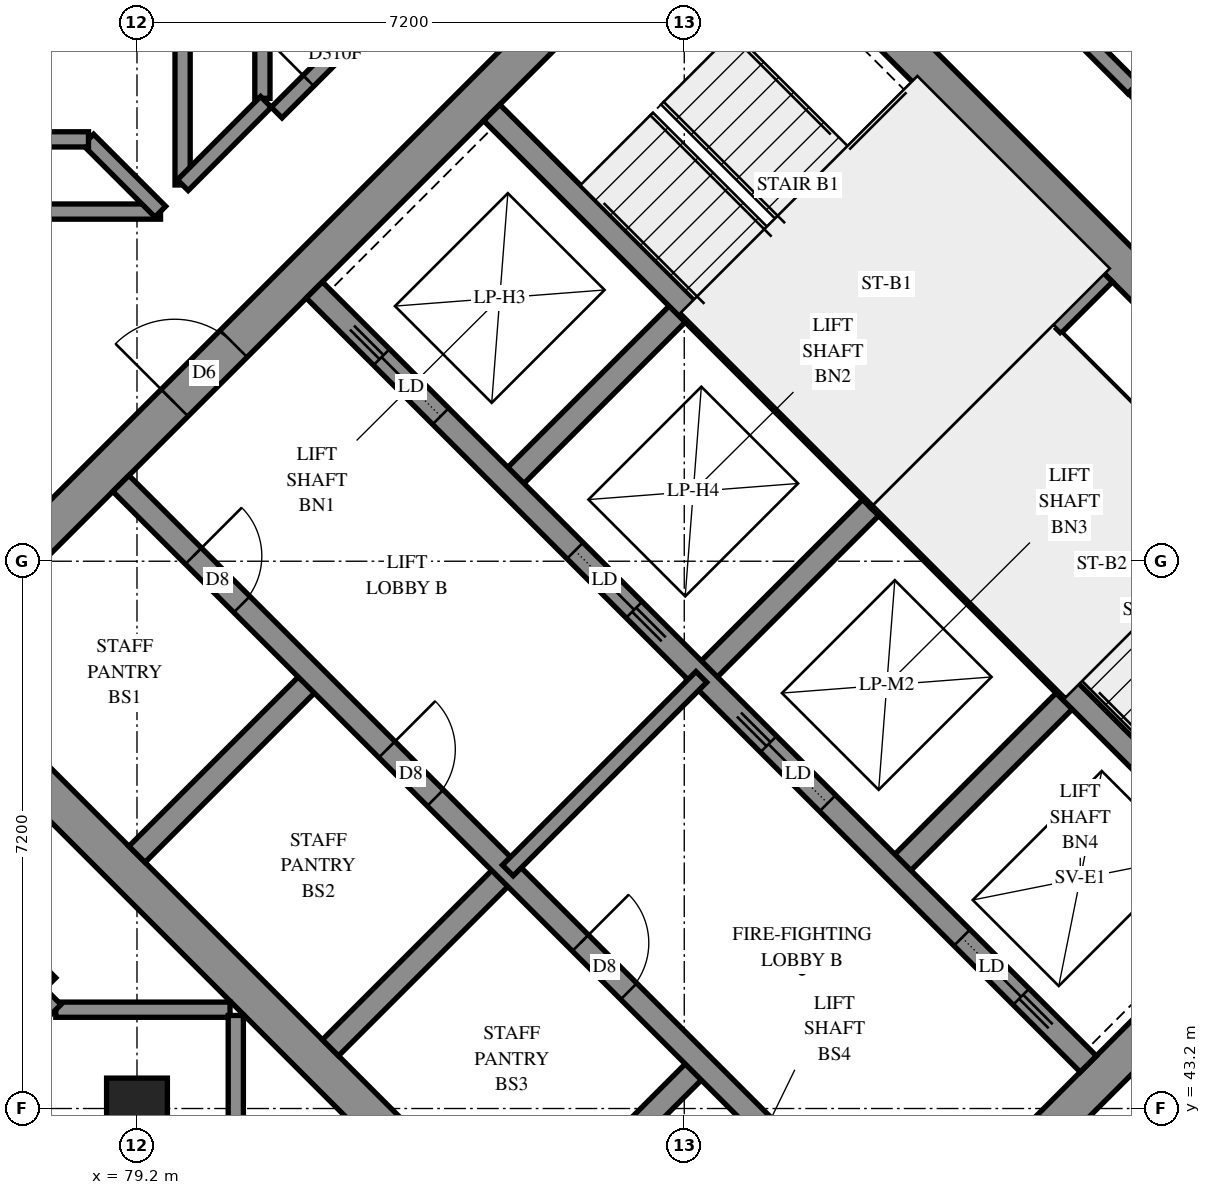
"""IFC4 building model, lengths in metres.
Left out: names, types, materials, properties, quantities, classifications, styles, units other than length and angle.
Written with IfcOpenShell. Run it as: python <this file> out.ifc"""

import sys

from ifc_helpers import new_model, si_unit, direction, frame, frame_2d, origin, origin_2d, place, context, subcontext, project, spatial, rectangle, extrude, element, fill, save


model = new_model("IFC4")
c1 = context("Model", 3, precision=1e-05, world=origin(), true_north=direction((0.0, 1.0)))
c2 = subcontext(c1, "Body", "Model", "MODEL_VIEW")
j1 = project(units=[si_unit("LENGTHUNIT", "METRE"), si_unit("PLANEANGLEUNIT", "RADIAN")], contexts=[c1])
p1 = place(None, origin())
s1 = spatial("IfcSite", under=j1, at=p1, CompositionType="ELEMENT")
p2 = place(p1, origin())
s2 = spatial("IfcBuilding", under=s1, at=p2, CompositionType="ELEMENT")
p3 = place(p2, frame((0.0, 0.0, 213.4)))
s3 = spatial("IfcBuildingStorey", under=s2, at=p3, CompositionType="ELEMENT", Elevation=213.4)
p4 = place(p3, frame((79.2, 43.2, 0.0), z_axis=(0.0, 0.0, 1.0), x_axis=(1.0, 0.0, 0.0)))
e1 = element("IfcColumn", 1, at=p4, inside=s3, PredefinedType="COLUMN", context=c2, shape_type="SweptSolid", body=[
    extrude(rectangle(XDim=0.8, YDim=0.8, at=origin_2d()), origin(), (0.0, 0.0, 1.0), 3.1),
])
p5 = place(p3, frame((76.124, 49.267, -0.3), z_axis=(0.0, 0.0, 1.0), x_axis=(0.7071067812, -0.7071067812, 0.0)))
e2 = element("IfcWall", 2, at=p5, inside=s3, PredefinedType="SHEAR", context=c2, shape_type="SweptSolid", body=[
    extrude(rectangle(XDim=15.4, YDim=0.5, at=frame_2d((7.7, 0.0))), origin(), (0.0, 0.0, 1.0), 2.7),
])
p6 = place(p3, frame((86.66, 59.802, -0.3), z_axis=(0.0, 0.0, 1.0), x_axis=(0.7071067812, -0.7071067812, 0.0)))
e3 = element("IfcWall", 3, at=p6, inside=s3, PredefinedType="SHEAR", context=c2, shape_type="SweptSolid", body=[
    extrude(rectangle(XDim=15.4, YDim=0.5, at=frame_2d((7.7, 0.0))), origin(), (0.0, 0.0, 1.0), 2.7),
])
p7 = place(p6, frame((10.5, 0.0, 0.3)))
e4 = element("IfcOpeningElement", 4, at=p7, cuts=e3, PredefinedType="OPENING", context=c2, shape_type="SweptSolid", body=[
    extrude(rectangle(XDim=0.8, YDim=2.1, at=frame_2d((0.4, 1.05))), frame((0.0, 0.26, 0.0), z_axis=(0.0, -1.0, 0.0), x_axis=(1.0, 0.0, 0.0)), (0.0, 0.0, 1.0), 0.52),
])
p8 = place(p3, frame((76.478, 49.267, -0.3), z_axis=(0.0, 0.0, 1.0), x_axis=(0.7071067812, 0.7071067812, 0.0)))
e5 = element("IfcWall", 5, at=p8, inside=s3, PredefinedType="SHEAR", context=c2, shape_type="SweptSolid", body=[
    extrude(rectangle(XDim=14.4, YDim=0.5, at=frame_2d((7.2, 0.0))), origin(), (0.0, 0.0, 1.0), 2.7),
])
p9 = place(p8, frame((4.55, 0.0, 0.3)))
e6 = element("IfcOpeningElement", 6, at=p9, cuts=e5, PredefinedType="OPENING", context=c2, shape_type="SweptSolid", body=[
    extrude(rectangle(XDim=1.1, YDim=2.1, at=frame_2d((0.55, 1.05))), frame((0.0, 0.26, 0.0), z_axis=(0.0, -1.0, 0.0), x_axis=(1.0, 0.0, 0.0)), (0.0, 0.0, 1.0), 0.52),
])
p10 = place(p8, frame((11.35, 0.0, 0.3)))
e7 = element("IfcOpeningElement", 7, at=p10, cuts=e5, PredefinedType="OPENING", context=c2, shape_type="SweptSolid", body=[
    extrude(rectangle(XDim=1.1, YDim=2.1, at=frame_2d((0.55, 1.05))), frame((0.0, 0.26, 0.0), z_axis=(0.0, -1.0, 0.0), x_axis=(1.0, 0.0, 0.0)), (0.0, 0.0, 1.0), 0.52),
])
p11 = place(p3, frame((87.013, 38.731, -0.3), z_axis=(0.0, 0.0, 1.0), x_axis=(0.7071067812, 0.7071067812, 0.0)))
e8 = element("IfcWall", 8, at=p11, inside=s3, PredefinedType="SHEAR", context=c2, shape_type="SweptSolid", body=[
    extrude(rectangle(XDim=14.4, YDim=0.5, at=frame_2d((7.2, 0.0))), origin(), (0.0, 0.0, 1.0), 2.7),
])
p12 = place(p11, frame((4.55, 0.0, 0.3)))
e9 = element("IfcOpeningElement", 9, at=p12, cuts=e8, PredefinedType="OPENING", context=c2, shape_type="SweptSolid", body=[
    extrude(rectangle(XDim=1.1, YDim=2.1, at=frame_2d((0.55, 1.05))), frame((0.0, 0.26, 0.0), z_axis=(0.0, -1.0, 0.0), x_axis=(1.0, 0.0, 0.0)), (0.0, 0.0, 1.0), 0.52),
])
p13 = place(p11, frame((11.35, 0.0, 0.3)))
e10 = element("IfcOpeningElement", 10, at=p13, cuts=e8, PredefinedType="OPENING", context=c2, shape_type="SweptSolid", body=[
    extrude(rectangle(XDim=1.1, YDim=2.1, at=frame_2d((0.55, 1.05))), frame((0.0, 0.26, 0.0), z_axis=(0.0, -1.0, 0.0), x_axis=(1.0, 0.0, 0.0)), (0.0, 0.0, 1.0), 0.52),
])
for number, where, z_axis, x_axis in (
    (11, (79.2, 46.544, 0.0), (0.0, 0.0, 1.0), (0.707, 0.707, 0.0)),
    (12, (84.079, 51.423, 0.0), (0.0, 0.0, 1.0), (0.707, 0.707, 0.0)),
):
    element("IfcWall", number, at=place(p3, frame(where, z_axis=z_axis, x_axis=x_axis)), inside=s3, PredefinedType="SOLIDWALL", context=c2, shape_type="SweptSolid", body=[
        extrude(rectangle(XDim=3.3, YDim=0.3, at=frame_2d((1.65, 0.0))), origin(), (0.0, 0.0, 1.0), 3.1),
    ])
p14 = place(p3, frame((81.746, 43.999, 0.0), z_axis=(0.0, 0.0, 1.0), x_axis=(0.7071067812, 0.7071067812, 0.0)))
e13 = element("IfcWall", 13, at=p14, inside=s3, PredefinedType="SOLIDWALL", context=c2, shape_type="SweptSolid", body=[
    extrude(rectangle(XDim=3.3, YDim=0.3, at=frame_2d((1.65, 0.0))), origin(), (0.0, 0.0, 1.0), 3.1),
])
p15 = place(p3, frame((86.625, 48.878, 0.0), z_axis=(0.0, 0.0, 1.0), x_axis=(0.7071067812, 0.7071067812, 0.0)))
e14 = element("IfcWall", 14, at=p15, inside=s3, PredefinedType="SOLIDWALL", context=c2, shape_type="SweptSolid", body=[
    extrude(rectangle(XDim=3.3, YDim=0.3, at=frame_2d((1.65, 0.0))), origin(), (0.0, 0.0, 1.0), 3.1),
])
p16 = place(p3, frame((84.291, 41.453, 0.0), z_axis=(0.0, 0.0, 1.0), x_axis=(0.7071067812, 0.7071067812, 0.0)))
e15 = element("IfcWall", 15, at=p16, inside=s3, PredefinedType="SOLIDWALL", context=c2, shape_type="SweptSolid", body=[
    extrude(rectangle(XDim=3.3, YDim=0.3, at=frame_2d((1.65, 0.0))), origin(), (0.0, 0.0, 1.0), 3.1),
])
p17 = place(p3, frame((89.17, 46.332, 0.0), z_axis=(0.0, 0.0, 1.0), x_axis=(0.7071067812, 0.7071067812, 0.0)))
e16 = element("IfcWall", 16, at=p17, inside=s3, PredefinedType="SOLIDWALL", context=c2, shape_type="SweptSolid", body=[
    extrude(rectangle(XDim=3.3, YDim=0.3, at=frame_2d((1.65, 0.0))), origin(), (0.0, 0.0, 1.0), 3.1),
])
p18 = place(p3, frame((78.988, 51.423, 0.0), z_axis=(0.0, 0.0, 1.0), x_axis=(0.7071067812, -0.7071067812, 0.0)))
e17 = element("IfcWall", 17, at=p18, inside=s3, PredefinedType="SOLIDWALL", context=c2, shape_type="SweptSolid", body=[
    extrude(rectangle(XDim=14.4, YDim=0.3, at=frame_2d((7.2, 0.0))), origin(), (0.0, 0.0, 1.0), 3.1),
])
p19 = place(p18, frame((1.35, 0.0, 0.0)))
e18 = element("IfcOpeningElement", 18, at=p19, cuts=e17, PredefinedType="OPENING", context=c2, shape_type="SweptSolid", body=[
    extrude(rectangle(XDim=0.9, YDim=2.1, at=frame_2d((0.45, 1.05))), frame((0.0, 0.16, 0.0), z_axis=(0.0, -1.0, 0.0), x_axis=(1.0, 0.0, 0.0)), (0.0, 0.0, 1.0), 0.32),
])
p20 = place(p18, frame((4.95, 0.0, 0.0)))
e19 = element("IfcOpeningElement", 19, at=p20, cuts=e17, PredefinedType="OPENING", context=c2, shape_type="SweptSolid", body=[
    extrude(rectangle(XDim=0.9, YDim=2.1, at=frame_2d((0.45, 1.05))), frame((0.0, 0.16, 0.0), z_axis=(0.0, -1.0, 0.0), x_axis=(1.0, 0.0, 0.0)), (0.0, 0.0, 1.0), 0.32),
])
p21 = place(p18, frame((8.55, 0.0, 0.0)))
e20 = element("IfcOpeningElement", 20, at=p21, cuts=e17, PredefinedType="OPENING", context=c2, shape_type="SweptSolid", body=[
    extrude(rectangle(XDim=0.9, YDim=2.1, at=frame_2d((0.45, 1.05))), frame((0.0, 0.16, 0.0), z_axis=(0.0, -1.0, 0.0), x_axis=(1.0, 0.0, 0.0)), (0.0, 0.0, 1.0), 0.32),
])
p22 = place(p18, frame((12.05, 0.0, 0.0)))
e21 = element("IfcOpeningElement", 21, at=p22, cuts=e17, PredefinedType="OPENING", context=c2, shape_type="SweptSolid", body=[
    extrude(rectangle(XDim=1.1, YDim=2.1, at=frame_2d((0.55, 1.05))), frame((0.0, 0.16, 0.0), z_axis=(0.0, -1.0, 0.0), x_axis=(1.0, 0.0, 0.0)), (0.0, 0.0, 1.0), 0.32),
])
p23 = place(p3, frame((81.534, 53.969, 0.0), z_axis=(0.0, 0.0, 1.0), x_axis=(0.707103309, -0.7071102534, 0.0)))
e22 = element("IfcWall", 22, at=p23, inside=s3, PredefinedType="SOLIDWALL", context=c2, shape_type="SweptSolid", body=[
    extrude(rectangle(XDim=14.4, YDim=0.3, at=frame_2d((7.2, 0.0))), origin(), (0.0, 0.0, 1.0), 3.1),
])
p24 = place(p23, frame((1.25, 0.0, 0.0)))
e23 = element("IfcOpeningElement", 23, at=p24, cuts=e22, PredefinedType="OPENING", context=c2, shape_type="SweptSolid", body=[
    extrude(rectangle(XDim=1.1, YDim=2.1, at=frame_2d((0.55, 1.05))), frame((0.0, 0.16, 0.0), z_axis=(0.0, -1.0, 0.0), x_axis=(1.0, 0.0, 0.0)), (0.0, 0.0, 1.0), 0.32),
])
p25 = place(p23, frame((4.85, 0.0, 0.0)))
e24 = element("IfcOpeningElement", 24, at=p25, cuts=e22, PredefinedType="OPENING", context=c2, shape_type="SweptSolid", body=[
    extrude(rectangle(XDim=1.1, YDim=2.1, at=frame_2d((0.55, 1.05))), frame((0.0, 0.16, 0.0), z_axis=(0.0, -1.0, 0.0), x_axis=(1.0, 0.0, 0.0)), (0.0, 0.0, 1.0), 0.32),
])
p26 = place(p23, frame((8.45, 0.0, 0.0)))
e25 = element("IfcOpeningElement", 25, at=p26, cuts=e22, PredefinedType="OPENING", context=c2, shape_type="SweptSolid", body=[
    extrude(rectangle(XDim=1.1, YDim=2.1, at=frame_2d((0.55, 1.05))), frame((0.0, 0.16, 0.0), z_axis=(0.0, -1.0, 0.0), x_axis=(1.0, 0.0, 0.0)), (0.0, 0.0, 1.0), 0.32),
])
p27 = place(p23, frame((12.05, 0.0, 0.0)))
e26 = element("IfcOpeningElement", 26, at=p27, cuts=e22, PredefinedType="OPENING", context=c2, shape_type="SweptSolid", body=[
    extrude(rectangle(XDim=1.1, YDim=2.1, at=frame_2d((0.55, 1.05))), frame((0.0, 0.16, 0.0), z_axis=(0.0, -1.0, 0.0), x_axis=(1.0, 0.0, 0.0)), (0.0, 0.0, 1.0), 0.32),
])
for number, where, z_axis, x_axis in (
    (27, (83.867, 56.302, 0.0), (0.0, 0.0, 1.0), (0.707, -0.707, 0.0)),
    (28, (88.958, 51.211, 0.0), (0.0, 0.0, 1.0), (0.707, -0.707, 0.0)),
):
    element("IfcWall", number, at=place(p3, frame(where, z_axis=z_axis, x_axis=x_axis)), inside=s3, PredefinedType="SOLIDWALL", context=c2, shape_type="SweptSolid", body=[
        extrude(rectangle(XDim=7.2, YDim=0.3, at=frame_2d((3.6, 0.0))), origin(), (0.0, 0.0, 1.0), 3.1),
    ])
p28 = place(p3, frame((88.958, 51.211, 0.0), z_axis=(0.0, 0.0, 1.0), x_axis=(0.7071067812, 0.7071067812, 0.0)))
e29 = element("IfcWall", 29, at=p28, inside=s3, PredefinedType="SOLIDWALL", context=c2, shape_type="SweptSolid", body=[
    extrude(rectangle(XDim=4.2, YDim=0.3, at=frame_2d((2.1, 0.0))), origin(), (0.0, 0.0, 1.0), 3.1),
])
p29 = place(p3, frame((91.313, 53.354, 0.0), z_axis=(0.0, 0.0, 1.0), x_axis=(0.7071140275, -0.7070995348, 0.0)))
e30 = element("IfcWall", 30, at=p29, inside=s3, PredefinedType="PARTITIONING", context=c2, shape_type="SweptSolid", body=[
    extrude(rectangle(XDim=6.9, YDim=0.15, at=frame_2d((3.45, 0.0))), origin(), (0.0, 0.0, 1.0), 3.1),
])
p30 = place(p3, frame((84.079, 46.332, 0.0), z_axis=(0.0, 0.0, 1.0), x_axis=(0.7071067812, 0.7071067812, 0.0)))
e31 = element("IfcWall", 31, at=p30, inside=s3, PredefinedType="PARTITIONING", context=c2, shape_type="SweptSolid", body=[
    extrude(rectangle(XDim=3.6, YDim=0.2, at=frame_2d((1.8, 0.0))), origin(), (0.0, 0.0, 1.0), 3.1),
])
p31 = place(p3, frame((81.037, 56.303, 0.0), z_axis=(0.0, 0.0, 1.0), x_axis=(0.7071067812, 0.7071067812, 0.0)))
e32 = element("IfcWall", 32, at=p31, inside=s3, PredefinedType="PARTITIONING", context=c2, shape_type="SweptSolid", body=[
    extrude(rectangle(XDim=8.2, YDim=0.2, at=frame_2d((4.1, 0.0))), origin(), (0.0, 0.0, 1.0), 3.1),
])
p32 = place(p31, frame((0.592, 0.0, 0.0)))
e33 = element("IfcOpeningElement", 33, at=p32, cuts=e32, PredefinedType="OPENING", context=c2, shape_type="SweptSolid", body=[
    extrude(rectangle(XDim=1.0, YDim=2.1, at=frame_2d((0.5, 1.05))), frame((0.0, 0.11, 0.0), z_axis=(0.0, -1.0, 0.0), x_axis=(1.0, 0.0, 0.0)), (0.0, 0.0, 1.0), 0.22),
])
p33 = place(p3, frame((73.999, 48.911, 0.0), z_axis=(0.0, 0.0, 1.0), x_axis=(0.7071067812, -0.7071067812, 0.0)))
e34 = element("IfcWall", 34, at=p33, inside=s3, PredefinedType="PARTITIONING", context=c2, shape_type="SweptSolid", body=[
    extrude(rectangle(XDim=5.745, YDim=0.2, at=frame_2d((2.872, 0.0))), origin(), (0.0, 0.0, 1.0), 3.1),
])
p34 = place(p33, frame((0.724, 0.0, 0.0)))
e35 = element("IfcOpeningElement", 35, at=p34, cuts=e34, PredefinedType="OPENING", context=c2, shape_type="SweptSolid", body=[
    extrude(rectangle(XDim=1.0, YDim=2.1, at=frame_2d((0.5, 1.05))), frame((0.0, 0.11, 0.0), z_axis=(0.0, -1.0, 0.0), x_axis=(1.0, 0.0, 0.0)), (0.0, 0.0, 1.0), 0.22),
])
p35 = place(p3, frame((88.247, 60.683, 0.0), z_axis=(0.0, 0.0, 1.0), x_axis=(0.7071067812, -0.7071067812, 0.0)))
e36 = element("IfcWall", 36, at=p35, inside=s3, PredefinedType="PARTITIONING", context=c2, shape_type="SweptSolid", body=[
    extrude(rectangle(XDim=5.742, YDim=0.2, at=frame_2d((2.871, 0.0))), origin(), (0.0, 0.0, 1.0), 3.1),
])
p36 = place(p35, frame((4.069, 0.0, 0.0)))
e37 = element("IfcOpeningElement", 37, at=p36, cuts=e36, PredefinedType="OPENING", context=c2, shape_type="SweptSolid", body=[
    extrude(rectangle(XDim=0.9, YDim=2.1, at=frame_2d((0.45, 1.05))), frame((0.0, 0.11, 0.0), z_axis=(0.0, -1.0, 0.0), x_axis=(1.0, 0.0, 0.0)), (0.0, 0.0, 1.0), 0.22),
])
p37 = place(p3, frame((74.002, 55.0, 0.0), z_axis=(0.0, 0.0, 1.0), x_axis=(1.0, 0.0, 0.0)))
e38 = element("IfcWall", 38, at=p37, inside=s3, PredefinedType="PARTITIONING", context=c2, shape_type="SweptSolid", body=[
    extrude(rectangle(XDim=5.508, YDim=0.2, at=frame_2d((2.754, 0.0))), origin(), (0.0, 0.0, 1.0), 3.1),
])
p38 = place(p37, frame((1.51, 0.0, 0.0)))
e39 = element("IfcOpeningElement", 39, at=p38, cuts=e38, PredefinedType="OPENING", context=c2, shape_type="SweptSolid", body=[
    extrude(rectangle(XDim=1.0, YDim=2.1, at=frame_2d((0.5, 1.05))), frame((0.0, 0.11, 0.0), z_axis=(0.0, -1.0, 0.0), x_axis=(1.0, 0.0, 0.0)), (0.0, 0.0, 1.0), 0.22),
])
p39 = place(p3, frame((79.8, 55.35, 0.0), z_axis=(0.0, 0.0, 1.0), x_axis=(0.0, 1.0, 0.0)))
e40 = element("IfcWall", 40, at=p39, inside=s3, PredefinedType="PARTITIONING", context=c2, shape_type="SweptSolid", body=[
    extrude(rectangle(XDim=3.9, YDim=0.2, at=frame_2d((1.95, 0.0))), origin(), (0.0, 0.0, 1.0), 3.1),
])
for number, where, z_axis, x_axis in (
    (41, (78.132, 44.5, 0.0), (0.0, 0.0, 1.0), (1.0, 0.0, 0.0)),
    (42, (80.5, 42.132, 0.0), (0.0, 0.0, 1.0), (0.0, 1.0, 0.0)),
):
    element("IfcWall", number, at=place(p3, frame(where, z_axis=z_axis, x_axis=x_axis)), inside=s3, PredefinedType="PARTITIONING", context=c2, shape_type="SweptSolid", body=[
        extrude(rectangle(XDim=2.292, YDim=0.2, at=frame_2d((1.146, 0.0))), origin(), (0.0, 0.0, 1.0), 3.1),
    ])
p40 = place(p3, frame((80.85, 56.49, 0.0), z_axis=(0.0, 0.0, 1.0), x_axis=(0.0, 1.0, 0.0)))
e43 = element("IfcWall", 43, at=p40, inside=s3, PredefinedType="PARTITIONING", context=c2, shape_type="SweptSolid", body=[
    extrude(rectangle(XDim=1.886, YDim=0.2, at=frame_2d((0.943, 0.0))), origin(), (0.0, 0.0, 1.0), 3.1),
])
p41 = place(p3, frame((79.803, 55.347, 0.0), z_axis=(0.0, 0.0, 1.0), x_axis=(0.706460727, 0.7077522457, 0.0)))
e44 = element("IfcWall", 44, at=p41, inside=s3, PredefinedType="PARTITIONING", context=c2, shape_type="SweptSolid", body=[
    extrude(rectangle(XDim=1.549, YDim=0.2, at=frame_2d((0.774, 0.0))), origin(), (0.0, 0.0, 1.0), 3.1),
])
p42 = place(p3, frame((92.311, 56.627, 0.0), z_axis=(0.0, 0.0, 1.0), x_axis=(0.7077922938, -0.7064206033, 0.0)))
e45 = element("IfcWall", 45, at=p42, inside=s3, PredefinedType="PARTITIONING", context=c2, shape_type="SweptSolid", body=[
    extrude(rectangle(XDim=1.458, YDim=0.2, at=frame_2d((0.729, 0.0))), origin(), (0.0, 0.0, 1.0), 3.1),
])
p43 = place(p3, frame((78.559, 55.947, 0.0), z_axis=(0.0, 0.0, 1.0), x_axis=(0.7071067812, -0.7071067812, 0.0)))
e46 = element("IfcWall", 46, at=p43, inside=s3, PredefinedType="PARTITIONING", context=c2, shape_type="SweptSolid", body=[
    extrude(rectangle(XDim=1.341, YDim=0.2, at=frame_2d((0.67, 0.0))), origin(), (0.0, 0.0, 1.0), 3.1),
])
p44 = place(p3, frame((77.552, 55.95, 0.0), z_axis=(0.0, 0.0, 1.0), x_axis=(1.0, 0.0, 0.0)))
e47 = element("IfcWall", 47, at=p44, inside=s3, PredefinedType="PARTITIONING", context=c2, shape_type="SweptSolid", body=[
    extrude(rectangle(XDim=1.01, YDim=0.2, at=frame_2d((0.505, 0.0))), origin(), (0.0, 0.0, 1.0), 3.1),
])
p45 = place(p3, frame((77.779, 44.847, 0.0), z_axis=(0.0, 0.0, 1.0), x_axis=(0.7071067812, -0.7071067812, 0.0)))
e48 = element("IfcWall", 48, at=p45, inside=s3, PredefinedType="PARTITIONING", context=c2, shape_type="SweptSolid", body=[
    extrude(rectangle(XDim=0.495, YDim=0.2, at=frame_2d((0.247, 0.0))), origin(), (0.0, 0.0, 1.0), 3.1),
])
p46 = place(p9, origin())
e49 = element("IfcDoor", 49, at=p46, inside=s3, OperationType="DOUBLE_DOOR_SINGLE_SWING", PredefinedType="DOOR", context=c2, shape_type="SweptSolid", body=[
    extrude(rectangle(XDim=1.1, YDim=2.1, at=frame_2d((0.55, 1.05))), frame((0.0, 0.025, 0.0), z_axis=(0.0, -1.0, 0.0), x_axis=(1.0, 0.0, 0.0)), (0.0, 0.0, 1.0), 0.05),
])
fill(e6, e49)
p47 = place(p19, origin())
e50 = element("IfcDoor", 50, at=p47, inside=s3, OperationType="SINGLE_SWING_LEFT", PredefinedType="DOOR", context=c2, shape_type="SweptSolid", body=[
    extrude(rectangle(XDim=0.9, YDim=2.1, at=frame_2d((0.45, 1.05))), frame((0.0, 0.025, 0.0), z_axis=(0.0, -1.0, 0.0), x_axis=(1.0, 0.0, 0.0)), (0.0, 0.0, 1.0), 0.05),
])
fill(e18, e50)
p48 = place(p20, origin())
e51 = element("IfcDoor", 51, at=p48, inside=s3, OperationType="SINGLE_SWING_LEFT", PredefinedType="DOOR", context=c2, shape_type="SweptSolid", body=[
    extrude(rectangle(XDim=0.9, YDim=2.1, at=frame_2d((0.45, 1.05))), frame((0.0, 0.025, 0.0), z_axis=(0.0, -1.0, 0.0), x_axis=(1.0, 0.0, 0.0)), (0.0, 0.0, 1.0), 0.05),
])
fill(e19, e51)
p49 = place(p21, origin())
e52 = element("IfcDoor", 52, at=p49, inside=s3, OperationType="SINGLE_SWING_LEFT", PredefinedType="DOOR", context=c2, shape_type="SweptSolid", body=[
    extrude(rectangle(XDim=0.9, YDim=2.1, at=frame_2d((0.45, 1.05))), frame((0.0, 0.025, 0.0), z_axis=(0.0, -1.0, 0.0), x_axis=(1.0, 0.0, 0.0)), (0.0, 0.0, 1.0), 0.05),
])
fill(e20, e52)
p50 = place(p24, origin())
e53 = element("IfcDoor", 53, at=p50, inside=s3, OperationType="SLIDING_TO_LEFT", PredefinedType="DOOR", context=c2, shape_type="SweptSolid", body=[
    extrude(rectangle(XDim=1.1, YDim=2.1, at=frame_2d((0.55, 1.05))), frame((0.0, 0.025, 0.0), z_axis=(0.0, -1.0, 0.0), x_axis=(1.0, 0.0, 0.0)), (0.0, 0.0, 1.0), 0.05),
])
fill(e23, e53)
p51 = place(p25, origin())
e54 = element("IfcDoor", 54, at=p51, inside=s3, OperationType="SLIDING_TO_RIGHT", PredefinedType="DOOR", context=c2, shape_type="SweptSolid", body=[
    extrude(rectangle(XDim=1.1, YDim=2.1, at=frame_2d((0.55, 1.05))), frame((0.0, 0.025, 0.0), z_axis=(0.0, -1.0, 0.0), x_axis=(1.0, 0.0, 0.0)), (0.0, 0.0, 1.0), 0.05),
])
fill(e24, e54)
p52 = place(p26, origin())
e55 = element("IfcDoor", 55, at=p52, inside=s3, OperationType="SLIDING_TO_LEFT", PredefinedType="DOOR", context=c2, shape_type="SweptSolid", body=[
    extrude(rectangle(XDim=1.1, YDim=2.1, at=frame_2d((0.55, 1.05))), frame((0.0, 0.025, 0.0), z_axis=(0.0, -1.0, 0.0), x_axis=(1.0, 0.0, 0.0)), (0.0, 0.0, 1.0), 0.05),
])
fill(e25, e55)
p53 = place(p27, origin())
e56 = element("IfcDoor", 56, at=p53, inside=s3, OperationType="SLIDING_TO_RIGHT", PredefinedType="DOOR", context=c2, shape_type="SweptSolid", body=[
    extrude(rectangle(XDim=1.1, YDim=2.1, at=frame_2d((0.55, 1.05))), frame((0.0, 0.025, 0.0), z_axis=(0.0, -1.0, 0.0), x_axis=(1.0, 0.0, 0.0)), (0.0, 0.0, 1.0), 0.05),
])
fill(e26, e56)
p54 = place(p32, origin())
e57 = element("IfcDoor", 57, at=p54, inside=s3, OperationType="SINGLE_SWING_RIGHT", PredefinedType="DOOR", context=c2, shape_type="SweptSolid", body=[
    extrude(rectangle(XDim=1.0, YDim=2.1, at=frame_2d((0.5, 1.05))), frame((0.0, 0.025, 0.0), z_axis=(0.0, -1.0, 0.0), x_axis=(1.0, 0.0, 0.0)), (0.0, 0.0, 1.0), 0.05),
])
fill(e33, e57)
save(model, sys.argv[1])
